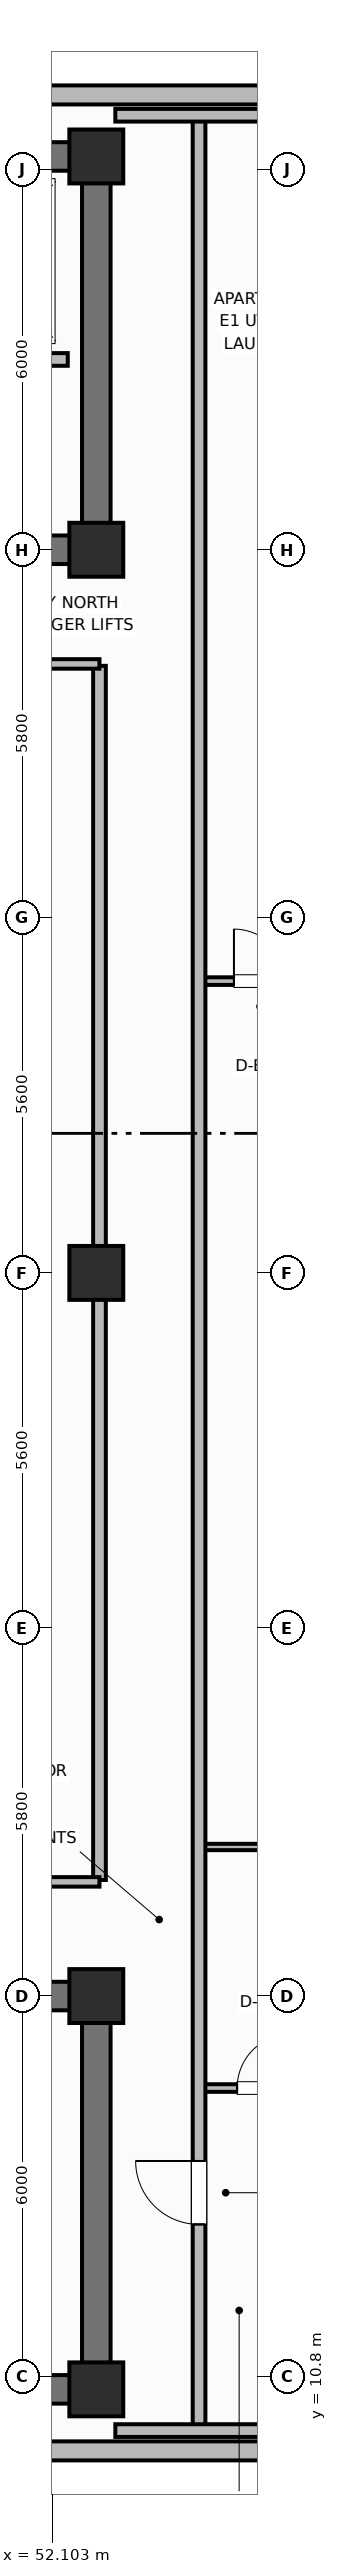
"""IFC4 building model, lengths in metres.
Left out: names, types, materials, properties, quantities, classifications, styles, units other than length and angle.
Written with IfcOpenShell. Run it as: python <this file> out.ifc"""

import sys

from ifc_helpers import new_model, si_unit, direction, frame, frame_2d, origin, origin_2d, place, context, subcontext, project, spatial, rectangle, extrude, element, fill, save


model = new_model("IFC4")
c1 = context("Model", 3, precision=1e-05, world=origin(), true_north=direction((0.0, 1.0)))
c2 = subcontext(c1, "Body", "Model", "MODEL_VIEW")
j1 = project(units=[si_unit("LENGTHUNIT", "METRE"), si_unit("PLANEANGLEUNIT", "RADIAN")], contexts=[c1])
p1 = place(None, origin())
s1 = spatial("IfcSite", under=j1, at=p1, CompositionType="ELEMENT")
p2 = place(p1, origin())
s2 = spatial("IfcBuilding", under=s1, at=p2, CompositionType="ELEMENT")
p3 = place(p2, frame((0.0, 0.0, 251.7)))
s3 = spatial("IfcBuildingStorey", under=s2, at=p3, CompositionType="ELEMENT", Elevation=251.7)
p4 = place(p3, frame((52.8, 10.6, 0.0), z_axis=(0.0, 0.0, 1.0), x_axis=(-1.0, 0.0, 0.0)))
e1 = element("IfcWall", 1, at=p4, inside=s3, PredefinedType="SHEAR", context=c2, shape_type="SweptSolid", body=[
    extrude(rectangle(XDim=27.2, YDim=0.45, at=frame_2d((13.6, 0.0))), origin(), (0.0, 0.0, 1.0), 3.7),
])
p5 = place(p3, frame((52.8, 10.825, 0.0), z_axis=(0.0, 0.0, 1.0), x_axis=(0.0, 1.0, 0.0)))
e2 = element("IfcWall", 2, at=p5, inside=s3, PredefinedType="SHEAR", context=c2, shape_type="SweptSolid", body=[
    extrude(rectangle(XDim=5.75, YDim=0.45, at=frame_2d((2.875, 0.0))), origin(), (0.0, 0.0, 1.0), 3.7),
])
p6 = place(p3, frame((25.6, 16.8, 0.0), z_axis=(0.0, 0.0, 1.0), x_axis=(1.0, 0.0, 0.0)))
e3 = element("IfcWall", 3, at=p6, inside=s3, PredefinedType="SHEAR", context=c2, shape_type="SweptSolid", body=[
    extrude(rectangle(XDim=27.2, YDim=0.45, at=frame_2d((13.6, 0.0))), origin(), (0.0, 0.0, 1.0), 3.7),
])
p7 = place(p6, frame((1.8, 0.0, 0.0)))
e4 = element("IfcOpeningElement", 4, at=p7, cuts=e3, PredefinedType="OPENING", context=c2, shape_type="SweptSolid", body=[
    extrude(rectangle(XDim=1.1, YDim=2.15, at=frame_2d((0.55, 1.075))), frame((0.0, 0.235, 0.0), z_axis=(0.0, -1.0, 0.0), x_axis=(1.0, 0.0, 0.0)), (0.0, 0.0, 1.0), 0.47),
])
p8 = place(p6, frame((5.6, 0.0, 0.0)))
e5 = element("IfcOpeningElement", 5, at=p8, cuts=e3, PredefinedType="OPENING", context=c2, shape_type="SweptSolid", body=[
    extrude(rectangle(XDim=0.85, YDim=2.1, at=frame_2d((0.425, 1.05))), frame((0.0, 0.235, 0.0), z_axis=(0.0, -1.0, 0.0), x_axis=(1.0, 0.0, 0.0)), (0.0, 0.0, 1.0), 0.47),
])
p9 = place(p6, frame((13.0, 0.0, 0.0)))
e6 = element("IfcOpeningElement", 6, at=p9, cuts=e3, PredefinedType="OPENING", context=c2, shape_type="SweptSolid", body=[
    extrude(rectangle(XDim=1.2, YDim=2.15, at=frame_2d((0.6, 1.075))), frame((0.0, 0.235, 0.0), z_axis=(0.0, -1.0, 0.0), x_axis=(1.0, 0.0, 0.0)), (0.0, 0.0, 1.0), 0.47),
])
p10 = place(p6, frame((19.2, 0.0, 0.0)))
e7 = element("IfcOpeningElement", 7, at=p10, cuts=e3, PredefinedType="OPENING", context=c2, shape_type="SweptSolid", body=[
    extrude(rectangle(XDim=0.85, YDim=2.1, at=frame_2d((0.425, 1.05))), frame((0.0, 0.235, 0.0), z_axis=(0.0, -1.0, 0.0), x_axis=(1.0, 0.0, 0.0)), (0.0, 0.0, 1.0), 0.47),
])
p11 = place(p6, frame((23.8, 0.0, 0.0)))
e8 = element("IfcOpeningElement", 8, at=p11, cuts=e3, PredefinedType="OPENING", context=c2, shape_type="SweptSolid", body=[
    extrude(rectangle(XDim=0.9, YDim=2.1, at=frame_2d((0.45, 1.05))), frame((0.0, 0.235, 0.0), z_axis=(0.0, -1.0, 0.0), x_axis=(1.0, 0.0, 0.0)), (0.0, 0.0, 1.0), 0.47),
])
p12 = place(p3, frame((25.6, 45.8, 0.0), z_axis=(0.0, 0.0, 1.0), x_axis=(1.0, 0.0, 0.0)))
e9 = element("IfcWall", 9, at=p12, inside=s3, PredefinedType="SHEAR", context=c2, shape_type="SweptSolid", body=[
    extrude(rectangle(XDim=27.2, YDim=0.45, at=frame_2d((13.6, 0.0))), origin(), (0.0, 0.0, 1.0), 3.7),
])
p13 = place(p3, frame((52.8, 39.825, 0.0), z_axis=(0.0, 0.0, 1.0), x_axis=(0.0, 1.0, 0.0)))
e10 = element("IfcWall", 10, at=p13, inside=s3, PredefinedType="SHEAR", context=c2, shape_type="SweptSolid", body=[
    extrude(rectangle(XDim=5.75, YDim=0.45, at=frame_2d((2.875, 0.0))), origin(), (0.0, 0.0, 1.0), 3.7),
])
p14 = place(p3, frame((52.8, 39.6, 0.0), z_axis=(0.0, 0.0, 1.0), x_axis=(-1.0, 0.0, 0.0)))
e11 = element("IfcWall", 11, at=p14, inside=s3, PredefinedType="SHEAR", context=c2, shape_type="SweptSolid", body=[
    extrude(rectangle(XDim=27.2, YDim=0.45, at=frame_2d((13.6, 0.0))), origin(), (0.0, 0.0, 1.0), 3.7),
])
p15 = place(p14, frame((24.2, 0.0, 0.0)))
e12 = element("IfcOpeningElement", 12, at=p15, cuts=e11, PredefinedType="OPENING", context=c2, shape_type="SweptSolid", body=[
    extrude(rectangle(XDim=1.1, YDim=2.15, at=frame_2d((0.55, 1.075))), frame((0.0, 0.235, 0.0), z_axis=(0.0, -1.0, 0.0), x_axis=(1.0, 0.0, 0.0)), (0.0, 0.0, 1.0), 0.47),
])
p16 = place(p14, frame((20.55, 0.0, 0.0)))
e13 = element("IfcOpeningElement", 13, at=p16, cuts=e11, PredefinedType="OPENING", context=c2, shape_type="SweptSolid", body=[
    extrude(rectangle(XDim=0.95, YDim=2.1, at=frame_2d((0.475, 1.05))), frame((0.0, 0.235, 0.0), z_axis=(0.0, -1.0, 0.0), x_axis=(1.0, 0.0, 0.0)), (0.0, 0.0, 1.0), 0.47),
])
p17 = place(p14, frame((15.1, 0.0, 0.0)))
e14 = element("IfcOpeningElement", 14, at=p17, cuts=e11, PredefinedType="OPENING", context=c2, shape_type="SweptSolid", body=[
    extrude(rectangle(XDim=1.2, YDim=2.15, at=frame_2d((0.6, 1.075))), frame((0.0, 0.235, 0.0), z_axis=(0.0, -1.0, 0.0), x_axis=(1.0, 0.0, 0.0)), (0.0, 0.0, 1.0), 0.47),
])
p18 = place(p14, frame((13.05, 0.0, 0.0)))
e15 = element("IfcOpeningElement", 15, at=p18, cuts=e11, PredefinedType="OPENING", context=c2, shape_type="SweptSolid", body=[
    extrude(rectangle(XDim=0.85, YDim=2.1, at=frame_2d((0.425, 1.05))), frame((0.0, 0.235, 0.0), z_axis=(0.0, -1.0, 0.0), x_axis=(1.0, 0.0, 0.0)), (0.0, 0.0, 1.0), 0.47),
])
p19 = place(p14, frame((11.0, 0.0, 0.0)))
e16 = element("IfcOpeningElement", 16, at=p19, cuts=e11, PredefinedType="OPENING", context=c2, shape_type="SweptSolid", body=[
    extrude(rectangle(XDim=0.85, YDim=2.1, at=frame_2d((0.425, 1.05))), frame((0.0, 0.235, 0.0), z_axis=(0.0, -1.0, 0.0), x_axis=(1.0, 0.0, 0.0)), (0.0, 0.0, 1.0), 0.47),
])
p20 = place(p14, frame((7.35, 0.0, 0.0)))
e17 = element("IfcOpeningElement", 17, at=p20, cuts=e11, PredefinedType="OPENING", context=c2, shape_type="SweptSolid", body=[
    extrude(rectangle(XDim=0.85, YDim=2.1, at=frame_2d((0.425, 1.05))), frame((0.0, 0.235, 0.0), z_axis=(0.0, -1.0, 0.0), x_axis=(1.0, 0.0, 0.0)), (0.0, 0.0, 1.0), 0.47),
])
p21 = place(p14, frame((4.2, 0.0, 0.0)))
e18 = element("IfcOpeningElement", 18, at=p21, cuts=e11, PredefinedType="OPENING", context=c2, shape_type="SweptSolid", body=[
    extrude(rectangle(XDim=1.3, YDim=2.2, at=frame_2d((0.65, 1.1))), frame((0.0, 0.235, 0.0), z_axis=(0.0, -1.0, 0.0), x_axis=(1.0, 0.0, 0.0)), (0.0, 0.0, 1.0), 0.47),
])
for number, where, z_axis, x_axis in (
    (19, (52.8, 10.6, 0.0), (0.0, 0.0, 1.0), (1.0, 0.0, 0.0)),
    (20, (52.8, 16.8, 0.0), (0.0, 0.0, 1.0), (1.0, 0.0, 0.0)),
    (21, (52.8, 39.6, 0.0), (0.0, 0.0, 1.0), (1.0, 0.0, 0.0)),
    (22, (52.8, 45.8, 0.0), (0.0, 0.0, 1.0), (1.0, 0.0, 0.0)),
    (23, (52.8, 28.2, 0.0), (0.0, 0.0, 1.0), (1.0, 0.0, 0.0)),
):
    element("IfcColumn", number, at=place(p3, frame(where, z_axis=z_axis, x_axis=x_axis)), inside=s3, PredefinedType="COLUMN", context=c2, shape_type="SweptSolid", body=[
        extrude(rectangle(XDim=0.85, YDim=0.85, at=origin_2d()), origin(), (0.0, 0.0, 1.0), 3.7),
    ])
p22 = place(p3, frame((22.56, 9.63, 0.0), z_axis=(0.0, 0.0, 1.0), x_axis=(1.0, 0.0, 0.0)))
e24 = element("IfcWall", 24, at=p22, inside=s3, PredefinedType="SOLIDWALL", context=c2, shape_type="SweptSolid", body=[
    extrude(rectangle(XDim=33.28, YDim=0.3, at=frame_2d((16.64, 0.0))), origin(), (0.0, 0.0, 1.0), 2.73),
])
p23 = place(p22, frame((4.461, 0.0, 0.95)))
e25 = element("IfcOpeningElement", 25, at=p23, cuts=e24, PredefinedType="OPENING", context=c2, shape_type="SweptSolid", body=[
    extrude(rectangle(XDim=1.1, YDim=1.65, at=frame_2d((0.55, 0.825))), frame((0.0, 0.16, 0.0), z_axis=(0.0, -1.0, 0.0), x_axis=(1.0, 0.0, 0.0)), (0.0, 0.0, 1.0), 0.32),
])
p24 = place(p22, frame((7.368, 0.0, 0.95)))
e26 = element("IfcOpeningElement", 26, at=p24, cuts=e24, PredefinedType="OPENING", context=c2, shape_type="SweptSolid", body=[
    extrude(rectangle(XDim=1.1, YDim=1.65, at=frame_2d((0.55, 0.825))), frame((0.0, 0.16, 0.0), z_axis=(0.0, -1.0, 0.0), x_axis=(1.0, 0.0, 0.0)), (0.0, 0.0, 1.0), 0.32),
])
p25 = place(p22, frame((10.275, 0.0, 0.95)))
e27 = element("IfcOpeningElement", 27, at=p25, cuts=e24, PredefinedType="OPENING", context=c2, shape_type="SweptSolid", body=[
    extrude(rectangle(XDim=1.1, YDim=1.65, at=frame_2d((0.55, 0.825))), frame((0.0, 0.16, 0.0), z_axis=(0.0, -1.0, 0.0), x_axis=(1.0, 0.0, 0.0)), (0.0, 0.0, 1.0), 0.32),
])
p26 = place(p22, frame((13.883, 0.0, 0.95)))
e28 = element("IfcOpeningElement", 28, at=p26, cuts=e24, PredefinedType="OPENING", context=c2, shape_type="SweptSolid", body=[
    extrude(rectangle(XDim=1.1, YDim=1.65, at=frame_2d((0.55, 0.825))), frame((0.0, 0.16, 0.0), z_axis=(0.0, -1.0, 0.0), x_axis=(1.0, 0.0, 0.0)), (0.0, 0.0, 1.0), 0.32),
])
p27 = place(p22, frame((16.09, 0.0, 0.95)))
e29 = element("IfcOpeningElement", 29, at=p27, cuts=e24, PredefinedType="OPENING", context=c2, shape_type="SweptSolid", body=[
    extrude(rectangle(XDim=1.1, YDim=1.65, at=frame_2d((0.55, 0.825))), frame((0.0, 0.16, 0.0), z_axis=(0.0, -1.0, 0.0), x_axis=(1.0, 0.0, 0.0)), (0.0, 0.0, 1.0), 0.32),
])
p28 = place(p22, frame((18.297, 0.0, 0.95)))
e30 = element("IfcOpeningElement", 30, at=p28, cuts=e24, PredefinedType="OPENING", context=c2, shape_type="SweptSolid", body=[
    extrude(rectangle(XDim=1.1, YDim=1.65, at=frame_2d((0.55, 0.825))), frame((0.0, 0.16, 0.0), z_axis=(0.0, -1.0, 0.0), x_axis=(1.0, 0.0, 0.0)), (0.0, 0.0, 1.0), 0.32),
])
p29 = place(p22, frame((21.905, 0.0, 0.95)))
e31 = element("IfcOpeningElement", 31, at=p29, cuts=e24, PredefinedType="OPENING", context=c2, shape_type="SweptSolid", body=[
    extrude(rectangle(XDim=1.1, YDim=1.65, at=frame_2d((0.55, 0.825))), frame((0.0, 0.16, 0.0), z_axis=(0.0, -1.0, 0.0), x_axis=(1.0, 0.0, 0.0)), (0.0, 0.0, 1.0), 0.32),
])
p30 = place(p22, frame((24.812, 0.0, 0.95)))
e32 = element("IfcOpeningElement", 32, at=p30, cuts=e24, PredefinedType="OPENING", context=c2, shape_type="SweptSolid", body=[
    extrude(rectangle(XDim=1.1, YDim=1.65, at=frame_2d((0.55, 0.825))), frame((0.0, 0.16, 0.0), z_axis=(0.0, -1.0, 0.0), x_axis=(1.0, 0.0, 0.0)), (0.0, 0.0, 1.0), 0.32),
])
p31 = place(p22, frame((27.719, 0.0, 0.95)))
e33 = element("IfcOpeningElement", 33, at=p31, cuts=e24, PredefinedType="OPENING", context=c2, shape_type="SweptSolid", body=[
    extrude(rectangle(XDim=1.1, YDim=1.65, at=frame_2d((0.55, 0.825))), frame((0.0, 0.16, 0.0), z_axis=(0.0, -1.0, 0.0), x_axis=(1.0, 0.0, 0.0)), (0.0, 0.0, 1.0), 0.32),
])
p32 = place(p3, frame((55.84, 46.77, 0.0), z_axis=(0.0, 0.0, 1.0), x_axis=(-1.0, 0.0, 0.0)))
e34 = element("IfcWall", 34, at=p32, inside=s3, PredefinedType="SOLIDWALL", context=c2, shape_type="SweptSolid", body=[
    extrude(rectangle(XDim=33.28, YDim=0.3, at=frame_2d((16.64, 0.0))), origin(), (0.0, 0.0, 1.0), 2.73),
])
p33 = place(p32, frame((4.647, 0.0, 0.71)))
e35 = element("IfcOpeningElement", 35, at=p33, cuts=e34, PredefinedType="OPENING", context=c2, shape_type="SweptSolid", body=[
    extrude(rectangle(XDim=1.6, YDim=1.9, at=frame_2d((0.8, 0.95))), frame((0.0, 0.16, 0.0), z_axis=(0.0, -1.0, 0.0), x_axis=(1.0, 0.0, 0.0)), (0.0, 0.0, 1.0), 0.32),
])
p34 = place(p32, frame((7.845, 0.0, 0.71)))
e36 = element("IfcOpeningElement", 36, at=p34, cuts=e34, PredefinedType="OPENING", context=c2, shape_type="SweptSolid", body=[
    extrude(rectangle(XDim=1.6, YDim=1.9, at=frame_2d((0.8, 0.95))), frame((0.0, 0.16, 0.0), z_axis=(0.0, -1.0, 0.0), x_axis=(1.0, 0.0, 0.0)), (0.0, 0.0, 1.0), 0.32),
])
p35 = place(p32, frame((14.241, 0.0, 0.71)))
e37 = element("IfcOpeningElement", 37, at=p35, cuts=e34, PredefinedType="OPENING", context=c2, shape_type="SweptSolid", body=[
    extrude(rectangle(XDim=1.6, YDim=1.9, at=frame_2d((0.8, 0.95))), frame((0.0, 0.16, 0.0), z_axis=(0.0, -1.0, 0.0), x_axis=(1.0, 0.0, 0.0)), (0.0, 0.0, 1.0), 0.32),
])
p36 = place(p32, frame((17.439, 0.0, 0.71)))
e38 = element("IfcOpeningElement", 38, at=p36, cuts=e34, PredefinedType="OPENING", context=c2, shape_type="SweptSolid", body=[
    extrude(rectangle(XDim=1.6, YDim=1.9, at=frame_2d((0.8, 0.95))), frame((0.0, 0.16, 0.0), z_axis=(0.0, -1.0, 0.0), x_axis=(1.0, 0.0, 0.0)), (0.0, 0.0, 1.0), 0.32),
])
p37 = place(p32, frame((23.835, 0.0, 0.71)))
e39 = element("IfcOpeningElement", 39, at=p37, cuts=e34, PredefinedType="OPENING", context=c2, shape_type="SweptSolid", body=[
    extrude(rectangle(XDim=1.6, YDim=1.9, at=frame_2d((0.8, 0.95))), frame((0.0, 0.16, 0.0), z_axis=(0.0, -1.0, 0.0), x_axis=(1.0, 0.0, 0.0)), (0.0, 0.0, 1.0), 0.32),
])
p38 = place(p32, frame((27.033, 0.0, 0.71)))
e40 = element("IfcOpeningElement", 40, at=p38, cuts=e34, PredefinedType="OPENING", context=c2, shape_type="SweptSolid", body=[
    extrude(rectangle(XDim=1.6, YDim=1.9, at=frame_2d((0.8, 0.95))), frame((0.0, 0.16, 0.0), z_axis=(0.0, -1.0, 0.0), x_axis=(1.0, 0.0, 0.0)), (0.0, 0.0, 1.0), 0.32),
])
p39 = place(p3, frame((52.35, 42.6, 0.0), z_axis=(0.0, 0.0, 1.0), x_axis=(-1.0, 0.0, 0.0)))
e41 = element("IfcWall", 41, at=p39, inside=s3, PredefinedType="PARTITIONING", context=c2, shape_type="SweptSolid", body=[
    extrude(rectangle(XDim=6.5, YDim=0.2, at=frame_2d((3.25, 0.0))), origin(), (0.0, 0.0, 1.0), 2.56),
])
p40 = place(p39, frame((4.9, 0.0, 0.0)))
e42 = element("IfcOpeningElement", 42, at=p40, cuts=e41, PredefinedType="OPENING", context=c2, shape_type="SweptSolid", body=[
    extrude(rectangle(XDim=1.0, YDim=2.15, at=frame_2d((0.5, 1.075))), frame((0.0, 0.11, 0.0), z_axis=(0.0, -1.0, 0.0), x_axis=(1.0, 0.0, 0.0)), (0.0, 0.0, 1.0), 0.22),
])
p41 = place(p39, frame((2.8, 0.0, 0.0)))
e43 = element("IfcOpeningElement", 43, at=p41, cuts=e41, PredefinedType="OPENING", context=c2, shape_type="SweptSolid", body=[
    extrude(rectangle(XDim=1.0, YDim=2.15, at=frame_2d((0.5, 1.075))), frame((0.0, 0.11, 0.0), z_axis=(0.0, -1.0, 0.0), x_axis=(1.0, 0.0, 0.0)), (0.0, 0.0, 1.0), 0.22),
])
p42 = place(p39, frame((0.7, 0.0, 0.0)))
e44 = element("IfcOpeningElement", 44, at=p42, cuts=e41, PredefinedType="OPENING", context=c2, shape_type="SweptSolid", body=[
    extrude(rectangle(XDim=1.0, YDim=2.15, at=frame_2d((0.5, 1.075))), frame((0.0, 0.11, 0.0), z_axis=(0.0, -1.0, 0.0), x_axis=(1.0, 0.0, 0.0)), (0.0, 0.0, 1.0), 0.22),
])
p43 = place(p3, frame((52.85, 18.63, 0.0), z_axis=(0.0, 0.0, 1.0), x_axis=(0.0, 1.0, 0.0)))
e45 = element("IfcWall", 45, at=p43, inside=s3, PredefinedType="PARTITIONING", context=c2, shape_type="SweptSolid", body=[
    extrude(rectangle(XDim=19.14, YDim=0.2, at=frame_2d((9.57, 0.0))), origin(), (0.0, 0.0, 1.0), 2.56),
])
for number, where, z_axis, x_axis in (
    (46, (30.7, 18.6, 0.0), (0.0, 0.0, 1.0), (1.0, 0.0, 0.0)),
    (47, (30.7, 37.8, 0.0), (0.0, 0.0, 1.0), (1.0, 0.0, 0.0)),
):
    element("IfcWall", number, at=place(p3, frame(where, z_axis=z_axis, x_axis=x_axis)), inside=s3, PredefinedType="PARTITIONING", context=c2, shape_type="SweptSolid", body=[
        extrude(rectangle(XDim=22.15, YDim=0.15, at=frame_2d((11.075, 0.0))), origin(), (0.0, 0.0, 1.0), 2.56),
    ])
p44 = place(p3, frame((54.42, 15.35, 0.0), z_axis=(0.0, 0.0, 1.0), x_axis=(1.0, 0.0, 0.0)))
e48 = element("IfcWall", 48, at=p44, inside=s3, PredefinedType="PARTITIONING", context=c2, shape_type="SweptSolid", body=[
    extrude(rectangle(XDim=1.95, YDim=0.12, at=frame_2d((0.975, 0.0))), origin(), (0.0, 0.0, 1.0), 2.56),
])
p45 = place(p44, frame((0.6, 0.0, 0.0)))
e49 = element("IfcOpeningElement", 49, at=p45, cuts=e48, PredefinedType="OPENING", context=c2, shape_type="SweptSolid", body=[
    extrude(rectangle(XDim=0.85, YDim=2.1, at=frame_2d((0.425, 1.05))), frame((0.0, 0.07, 0.0), z_axis=(0.0, -1.0, 0.0), x_axis=(1.0, 0.0, 0.0)), (0.0, 0.0, 1.0), 0.14),
])
p46 = place(p3, frame((54.42, 19.15, 0.0), z_axis=(0.0, 0.0, 1.0), x_axis=(1.0, 0.0, 0.0)))
e50 = element("IfcWall", 50, at=p46, inside=s3, PredefinedType="PARTITIONING", context=c2, shape_type="SweptSolid", body=[
    extrude(rectangle(XDim=1.95, YDim=0.1, at=frame_2d((0.975, 0.0))), origin(), (0.0, 0.0, 1.0), 2.56),
])
p47 = place(p3, frame((54.42, 32.8, 0.0), z_axis=(0.0, 0.0, 1.0), x_axis=(1.0, 0.0, 0.0)))
e51 = element("IfcWall", 51, at=p47, inside=s3, PredefinedType="PARTITIONING", context=c2, shape_type="SweptSolid", body=[
    extrude(rectangle(XDim=1.95, YDim=0.12, at=frame_2d((0.975, 0.0))), origin(), (0.0, 0.0, 1.0), 2.56),
])
p48 = place(p47, frame((0.55, 0.0, 0.0)))
e52 = element("IfcOpeningElement", 52, at=p48, cuts=e51, PredefinedType="OPENING", context=c2, shape_type="SweptSolid", body=[
    extrude(rectangle(XDim=0.82, YDim=2.08, at=frame_2d((0.41, 1.04))), frame((0.0, 0.07, 0.0), z_axis=(0.0, -1.0, 0.0), x_axis=(1.0, 0.0, 0.0)), (0.0, 0.0, 1.0), 0.14),
])
p49 = place(p3, frame((54.42, 9.95, 0.0), z_axis=(0.0, 0.0, 1.0), x_axis=(0.0, 1.0, 0.0)))
e53 = element("IfcWall", 53, at=p49, inside=s3, PredefinedType="PARTITIONING", context=c2, shape_type="SweptSolid", body=[
    extrude(rectangle(XDim=36.5, YDim=0.2, at=frame_2d((18.25, 0.0))), origin(), (0.0, 0.0, 1.0), 2.56),
])
p50 = place(p49, frame((3.25, 0.0, 0.0)))
e54 = element("IfcOpeningElement", 54, at=p50, cuts=e53, PredefinedType="OPENING", context=c2, shape_type="SweptSolid", body=[
    extrude(rectangle(XDim=1.0, YDim=2.15, at=frame_2d((0.5, 1.075))), frame((0.0, 0.11, 0.0), z_axis=(0.0, -1.0, 0.0), x_axis=(1.0, 0.0, 0.0)), (0.0, 0.0, 1.0), 0.22),
])
for number, where, z_axis, x_axis in (
    (55, (53.1, 9.95, 0.0), (0.0, 0.0, 1.0), (1.0, 0.0, 0.0)),
    (56, (53.1, 46.45, 0.0), (0.0, 0.0, 1.0), (1.0, 0.0, 0.0)),
):
    element("IfcWall", number, at=place(p3, frame(where, z_axis=z_axis, x_axis=x_axis)), inside=s3, PredefinedType="PARTITIONING", context=c2, shape_type="SweptSolid", body=[
        extrude(rectangle(XDim=3.754, YDim=0.2, at=frame_2d((1.877, 0.0))), origin(), (0.0, 0.0, 1.0), 2.56),
    ])
p51 = place(p45, origin())
e57 = element("IfcDoor", 57, at=p51, inside=s3, OperationType="SINGLE_SWING_RIGHT", PredefinedType="DOOR", context=c2, shape_type="SweptSolid", body=[
    extrude(rectangle(XDim=0.85, YDim=2.1, at=frame_2d((0.425, 1.05))), frame((0.0, 0.025, 0.0), z_axis=(0.0, -1.0, 0.0), x_axis=(1.0, 0.0, 0.0)), (0.0, 0.0, 1.0), 0.05),
])
fill(e49, e57)
p52 = place(p48, origin())
e58 = element("IfcDoor", 58, at=p52, inside=s3, OperationType="SINGLE_SWING_LEFT", PredefinedType="DOOR", context=c2, shape_type="SweptSolid", body=[
    extrude(rectangle(XDim=0.82, YDim=2.08, at=frame_2d((0.41, 1.04))), frame((0.0, 0.025, 0.0), z_axis=(0.0, -1.0, 0.0), x_axis=(1.0, 0.0, 0.0)), (0.0, 0.0, 1.0), 0.05),
])
fill(e52, e58)
p53 = place(p50, origin())
e59 = element("IfcDoor", 59, at=p53, inside=s3, OperationType="SINGLE_SWING_RIGHT", PredefinedType="DOOR", context=c2, shape_type="SweptSolid", body=[
    extrude(rectangle(XDim=1.0, YDim=2.15, at=frame_2d((0.5, 1.075))), frame((0.0, 0.025, 0.0), z_axis=(0.0, -1.0, 0.0), x_axis=(1.0, 0.0, 0.0)), (0.0, 0.0, 1.0), 0.05),
])
fill(e54, e59)
save(model, sys.argv[1])
